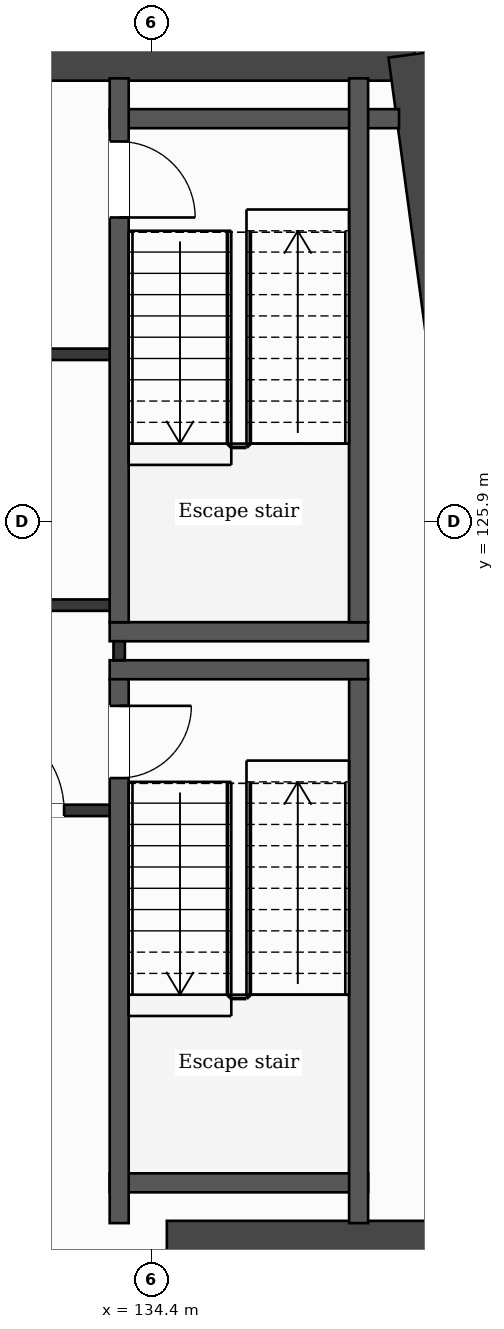
"""IFC4 building model, lengths in metres.
Left out: names, types, materials, properties, quantities, classifications, styles, units other than length and angle.
Written with IfcOpenShell. Run it as: python <this file> out.ifc"""

import sys

from ifc_helpers import new_model, si_unit, direction, frame, frame_2d, origin, place, context, subcontext, project, spatial, rectangle, extrude, element, fill, save


model = new_model("IFC4")
c1 = context("Model", 3, precision=1e-05, world=origin(), true_north=direction((0.0, 1.0)))
c2 = subcontext(c1, "Body", "Model", "MODEL_VIEW")
j1 = project(units=[si_unit("LENGTHUNIT", "METRE"), si_unit("PLANEANGLEUNIT", "RADIAN")], contexts=[c1])
p1 = place(None, origin())
s1 = spatial("IfcSite", under=j1, at=p1, CompositionType="ELEMENT")
p2 = place(p1, origin())
s2 = spatial("IfcBuilding", under=s1, at=p2, CompositionType="ELEMENT")
p3 = place(p2, frame((0.0, 0.0, 259.0)))
s3 = spatial("IfcBuildingStorey", under=s2, at=p3, CompositionType="ELEMENT", Elevation=259.0)
p4 = place(p3, frame((126.35, 132.05, 0.0), z_axis=(0.0, 0.0, 1.0), x_axis=(1.0, 0.0, 0.0)))
e1 = element("IfcWall", 1, at=p4, inside=s3, PredefinedType="SHEAR", context=c2, shape_type="SweptSolid", body=[
    extrude(rectangle(XDim=11.513, YDim=0.7, at=frame_2d((5.757, 0.0))), origin(), (0.0, 0.0, 1.0), 3.7),
])
p5 = place(p4, frame((3.386, 0.0, 0.0)))
e2 = element("IfcOpeningElement", 2, at=p5, cuts=e1, PredefinedType="OPENING", context=c2, shape_type="SweptSolid", body=[
    extrude(rectangle(XDim=1.2, YDim=2.1, at=frame_2d((0.6, 1.05))), frame((0.0, 0.36, 0.0), z_axis=(0.0, -1.0, 0.0), x_axis=(1.0, 0.0, 0.0)), (0.0, 0.0, 1.0), 0.72),
])
p6 = place(p3, frame((137.863, 132.05, 0.0), z_axis=(0.0, 0.0, 1.0), x_axis=(0.133406218907, -0.991061441464, 0.0)))
e3 = element("IfcWall", 3, at=p6, inside=s3, PredefinedType="SHEAR", context=c2, shape_type="SweptSolid", body=[
    extrude(rectangle(XDim=21.492, YDim=0.7, at=frame_2d((10.746, 0.0))), origin(), (0.0, 0.0, 1.0), 3.7),
])
p7 = place(p3, frame((134.6, 116.35, 0.0), z_axis=(0.0, 0.0, 1.0), x_axis=(1.0, 0.0, 0.0)))
e4 = element("IfcWall", 4, at=p7, inside=s3, PredefinedType="SHEAR", context=c2, shape_type="SweptSolid", body=[
    extrude(rectangle(XDim=5.077, YDim=0.7, at=frame_2d((2.539, 0.0))), origin(), (0.0, 0.0, 1.0), 3.7),
])
p8 = place(p3, frame((133.848, 117.2, 0.0), z_axis=(0.0, 0.0, 1.0), x_axis=(1.0, 0.0, 0.0)))
e5 = element("IfcWall", 5, at=p8, inside=s3, PredefinedType="PARTITIONING", context=c2, shape_type="SweptSolid", body=[
    extrude(rectangle(XDim=3.4, YDim=0.25, at=frame_2d((1.7, 0.0))), origin(), (0.0, 0.0, 1.0), 3.38),
])
p9 = place(p3, frame((131.573, 122.1, 0.0), z_axis=(0.0, 0.0, 1.0), x_axis=(1.0, 0.0, 0.0)))
e6 = element("IfcWall", 6, at=p9, inside=s3, PredefinedType="PARTITIONING", context=c2, shape_type="SweptSolid", body=[
    extrude(rectangle(XDim=2.4, YDim=0.15, at=frame_2d((1.2, 0.0))), origin(), (0.0, 0.0, 1.0), 3.38),
])
p10 = place(p9, frame((0.475, 0.0, 0.0)))
e7 = element("IfcOpeningElement", 7, at=p10, cuts=e6, PredefinedType="OPENING", context=c2, shape_type="SweptSolid", body=[
    extrude(rectangle(XDim=1.2, YDim=2.1, at=frame_2d((0.6, 1.05))), frame((0.0, 0.085, 0.0), z_axis=(0.0, -1.0, 0.0), x_axis=(1.0, 0.0, 0.0)), (0.0, 0.0, 1.0), 0.17),
])
for number, where, z_axis, x_axis in (
    (8, (133.848, 123.95, 0.0), (0.0, 0.0, 1.0), (1.0, 0.0, 0.0)),
    (9, (133.848, 124.45, 0.0), (0.0, 0.0, 1.0), (1.0, 0.0, 0.0)),
):
    element("IfcWall", number, at=place(p3, frame(where, z_axis=z_axis, x_axis=x_axis)), inside=s3, PredefinedType="PARTITIONING", context=c2, shape_type="SweptSolid", body=[
        extrude(rectangle(XDim=3.4, YDim=0.25, at=frame_2d((1.7, 0.0))), origin(), (0.0, 0.0, 1.0), 3.38),
    ])
p11 = place(p3, frame((131.549, 124.8, 0.0), z_axis=(0.0, 0.0, 1.0), x_axis=(1.0, 0.0, 0.0)))
e10 = element("IfcWall", 10, at=p11, inside=s3, PredefinedType="PARTITIONING", context=c2, shape_type="SweptSolid", body=[
    extrude(rectangle(XDim=2.549, YDim=0.15, at=frame_2d((1.275, 0.0))), origin(), (0.0, 0.0, 1.0), 3.38),
])
p12 = place(p3, frame((131.549, 128.1, 0.0), z_axis=(0.0, 0.0, 1.0), x_axis=(1.0, 0.0, 0.0)))
e11 = element("IfcWall", 11, at=p12, inside=s3, PredefinedType="PARTITIONING", context=c2, shape_type="SweptSolid", body=[
    extrude(rectangle(XDim=2.424, YDim=0.15, at=frame_2d((1.212, 0.0))), origin(), (0.0, 0.0, 1.0), 3.38),
])
p13 = place(p3, frame((133.848, 131.2, 0.0), z_axis=(0.0, 0.0, 1.0), x_axis=(1.0, 0.0, 0.0)))
e12 = element("IfcWall", 12, at=p13, inside=s3, PredefinedType="PARTITIONING", context=c2, shape_type="SweptSolid", body=[
    extrude(rectangle(XDim=3.807, YDim=0.25, at=frame_2d((1.903, 0.0))), origin(), (0.0, 0.0, 1.0), 3.38),
])
p14 = place(p3, frame((133.973, 124.075, 0.0), z_axis=(0.0, 0.0, 1.0), x_axis=(0.0, 1.0, 0.0)))
e13 = element("IfcWall", 13, at=p14, inside=s3, PredefinedType="PARTITIONING", context=c2, shape_type="SweptSolid", body=[
    extrude(rectangle(XDim=0.25, YDim=0.15, at=frame_2d((0.125, 0.0))), origin(), (0.0, 0.0, 1.0), 3.38),
])
p15 = place(p3, frame((133.973, 116.67, 0.0), z_axis=(0.0, 0.0, 1.0), x_axis=(0.0, 1.0, 0.0)))
e14 = element("IfcWall", 14, at=p15, inside=s3, PredefinedType="PARTITIONING", context=c2, shape_type="SweptSolid", body=[
    extrude(rectangle(XDim=7.155, YDim=0.25, at=frame_2d((3.578, 0.0))), origin(), (0.0, 0.0, 1.0), 3.38),
])
p16 = place(p15, frame((5.855, 0.0, 0.0)))
e15 = element("IfcOpeningElement", 15, at=p16, cuts=e14, PredefinedType="OPENING", context=c2, shape_type="SweptSolid", body=[
    extrude(rectangle(XDim=0.95, YDim=2.1, at=frame_2d((0.475, 1.05))), frame((0.0, 0.135, 0.0), z_axis=(0.0, -1.0, 0.0), x_axis=(1.0, 0.0, 0.0)), (0.0, 0.0, 1.0), 0.27),
])
p17 = place(p3, frame((133.973, 124.575, 0.0), z_axis=(0.0, 0.0, 1.0), x_axis=(0.0, 1.0, 0.0)))
e16 = element("IfcWall", 16, at=p17, inside=s3, PredefinedType="PARTITIONING", context=c2, shape_type="SweptSolid", body=[
    extrude(rectangle(XDim=7.155, YDim=0.25, at=frame_2d((3.578, 0.0))), origin(), (0.0, 0.0, 1.0), 3.38),
])
p18 = place(p17, frame((5.325, 0.0, 0.0)))
e17 = element("IfcOpeningElement", 17, at=p18, cuts=e16, PredefinedType="OPENING", context=c2, shape_type="SweptSolid", body=[
    extrude(rectangle(XDim=1.0, YDim=2.1, at=frame_2d((0.5, 1.05))), frame((0.0, 0.135, 0.0), z_axis=(0.0, -1.0, 0.0), x_axis=(1.0, 0.0, 0.0)), (0.0, 0.0, 1.0), 0.27),
])
for number, where, z_axis, x_axis in (
    (18, (137.123, 116.67, 0.0), (0.0, 0.0, 1.0), (0.0, 1.0, 0.0)),
    (19, (137.123, 124.575, 0.0), (0.0, 0.0, 1.0), (0.0, 1.0, 0.0)),
):
    element("IfcWall", number, at=place(p3, frame(where, z_axis=z_axis, x_axis=x_axis)), inside=s3, PredefinedType="PARTITIONING", context=c2, shape_type="SweptSolid", body=[
        extrude(rectangle(XDim=7.155, YDim=0.25, at=frame_2d((3.578, 0.0))), origin(), (0.0, 0.0, 1.0), 3.38),
    ])
p19 = place(p10, origin())
e20 = element("IfcDoor", 20, at=p19, inside=s3, OperationType="SINGLE_SWING_LEFT", PredefinedType="DOOR", context=c2, shape_type="SweptSolid", body=[
    extrude(rectangle(XDim=1.2, YDim=2.1, at=frame_2d((0.6, 1.05))), frame((0.0, 0.025, 0.0), z_axis=(0.0, -1.0, 0.0), x_axis=(1.0, 0.0, 0.0)), (0.0, 0.0, 1.0), 0.05),
])
fill(e7, e20)
p20 = place(p16, origin())
e21 = element("IfcDoor", 21, at=p20, inside=s3, OperationType="SINGLE_SWING_RIGHT", PredefinedType="DOOR", context=c2, shape_type="SweptSolid", body=[
    extrude(rectangle(XDim=0.95, YDim=2.1, at=frame_2d((0.475, 1.05))), frame((0.0, 0.025, 0.0), z_axis=(0.0, -1.0, 0.0), x_axis=(1.0, 0.0, 0.0)), (0.0, 0.0, 1.0), 0.05),
])
fill(e15, e21)
p21 = place(p18, origin())
e22 = element("IfcDoor", 22, at=p21, inside=s3, OperationType="SINGLE_SWING_LEFT", PredefinedType="DOOR", context=c2, shape_type="SweptSolid", body=[
    extrude(rectangle(XDim=1.0, YDim=2.1, at=frame_2d((0.5, 1.05))), frame((0.0, 0.025, 0.0), z_axis=(0.0, -1.0, 0.0), x_axis=(1.0, 0.0, 0.0)), (0.0, 0.0, 1.0), 0.05),
])
fill(e17, e22)
save(model, sys.argv[1])
